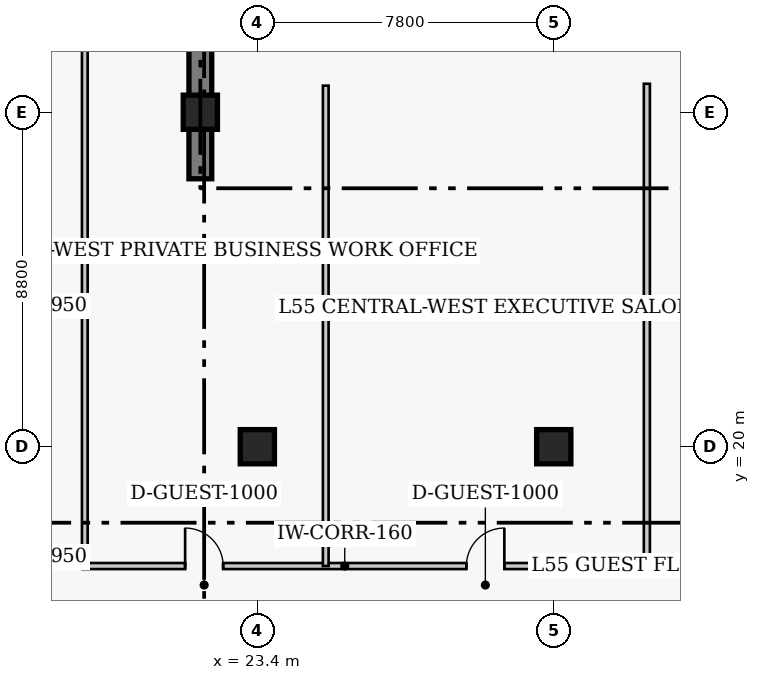
"""IFC4 building model, lengths in metres.
Left out: names, types, materials, properties, quantities, classifications, styles, units other than length and angle.
Written with IfcOpenShell. Run it as: python <this file> out.ifc"""

import sys

from ifc_helpers import new_model, si_unit, direction, frame, frame_2d, origin, origin_2d, place, context, subcontext, project, spatial, rectangle, extrude, element, fill, save


model = new_model("IFC4")
c1 = context("Model", 3, precision=1e-05, world=origin(), true_north=direction((0.0, 1.0)))
c2 = subcontext(c1, "Body", "Model", "MODEL_VIEW")
j1 = project(units=[si_unit("LENGTHUNIT", "METRE"), si_unit("PLANEANGLEUNIT", "RADIAN")], contexts=[c1])
p1 = place(None, origin())
s1 = spatial("IfcSite", under=j1, at=p1, CompositionType="ELEMENT")
p2 = place(p1, origin())
s2 = spatial("IfcBuilding", under=s1, at=p2, CompositionType="ELEMENT")
p3 = place(p2, frame((0.0, 0.0, 220.2)))
s3 = spatial("IfcBuildingStorey", under=s2, at=p3, CompositionType="ELEMENT", Elevation=220.2)
p4 = place(p3, frame((21.9, 27.05, 0.0), z_axis=(0.0, 0.0, 1.0), x_axis=(0.0, 1.0, 0.0)))
e1 = element("IfcWall", 1, at=p4, inside=s3, PredefinedType="SHEAR", context=c2, shape_type="SweptSolid", body=[
    extrude(rectangle(XDim=13.57, YDim=0.6, at=frame_2d((6.785, 0.0))), origin(), (0.0, 0.0, 1.0), 3.9),
])
for number, where, z_axis, x_axis in (
    (2, (23.4, 20.0, 0.0), (0.0, 0.0, 1.0), (1.0, 0.0, 0.0)),
    (3, (31.2, 20.0, 0.0), (0.0, 0.0, 1.0), (1.0, 0.0, 0.0)),
    (4, (21.9, 28.8, 0.0), (0.0, 0.0, 1.0), (1.0, 0.0, 0.0)),
):
    element("IfcColumn", number, at=place(p3, frame(where, z_axis=z_axis, x_axis=x_axis)), inside=s3, PredefinedType="COLUMN", context=c2, shape_type="SweptSolid", body=[
        extrude(rectangle(XDim=0.9, YDim=0.9, at=origin_2d()), origin(), (0.0, 0.0, 1.0), 3.9),
    ])
p5 = place(p3, frame((18.8, 16.86, 0.0), z_axis=(0.0, 0.0, 1.0), x_axis=(1.0, 0.0, 0.0)))
e5 = element("IfcWall", 5, at=p5, inside=s3, PredefinedType="PARTITIONING", context=c2, shape_type="SweptSolid", body=[
    extrude(rectangle(XDim=14.85, YDim=0.16, at=frame_2d((7.425, 0.0))), origin(), (0.0, 0.0, 1.0), 3.65),
])
p6 = place(p5, frame((2.7, 0.0, 0.0)))
e6 = element("IfcOpeningElement", 6, at=p6, cuts=e5, PredefinedType="OPENING", context=c2, shape_type="SweptSolid", body=[
    extrude(rectangle(XDim=1.0, YDim=2.15, at=frame_2d((0.5, 1.075))), frame((0.0, 0.09, 0.0), z_axis=(0.0, -1.0, 0.0), x_axis=(1.0, 0.0, 0.0)), (0.0, 0.0, 1.0), 0.18),
])
p7 = place(p5, frame((10.1, 0.0, 0.0)))
e7 = element("IfcOpeningElement", 7, at=p7, cuts=e5, PredefinedType="OPENING", context=c2, shape_type="SweptSolid", body=[
    extrude(rectangle(XDim=1.0, YDim=2.15, at=frame_2d((0.5, 1.075))), frame((0.0, 0.09, 0.0), z_axis=(0.0, -1.0, 0.0), x_axis=(1.0, 0.0, 0.0)), (0.0, 0.0, 1.0), 0.18),
])
p8 = place(p3, frame((33.65, 16.86, 0.0), z_axis=(0.0, 0.0, 1.0), x_axis=(0.0, 1.0, 0.0)))
e8 = element("IfcWall", 8, at=p8, inside=s3, PredefinedType="PARTITIONING", context=c2, shape_type="SweptSolid", body=[
    extrude(rectangle(XDim=12.69, YDim=0.16, at=frame_2d((6.345, 0.0))), origin(), (0.0, 0.0, 1.0), 3.65),
])
p9 = place(p3, frame((18.86, 16.86, 0.0), z_axis=(0.0, 0.0, 1.0), x_axis=(0.0, 1.0, 0.0)))
e9 = element("IfcWall", 9, at=p9, inside=s3, PredefinedType="PARTITIONING", context=c2, shape_type="SweptSolid", body=[
    extrude(rectangle(XDim=15.94, YDim=0.15, at=frame_2d((7.97, 0.0))), origin(), (0.0, 0.0, 1.0), 3.65),
])
p10 = place(p3, frame((25.2, 16.86, 0.0), z_axis=(0.0, 0.0, 1.0), x_axis=(0.0, 1.0, 0.0)))
e10 = element("IfcWall", 10, at=p10, inside=s3, PredefinedType="PARTITIONING", context=c2, shape_type="SweptSolid", body=[
    extrude(rectangle(XDim=12.64, YDim=0.15, at=frame_2d((6.32, 0.0))), origin(), (0.0, 0.0, 1.0), 3.65),
])
p11 = place(p6, origin())
e11 = element("IfcDoor", 11, at=p11, inside=s3, OperationType="SINGLE_SWING_LEFT", PredefinedType="DOOR", context=c2, shape_type="SweptSolid", body=[
    extrude(rectangle(XDim=1.0, YDim=2.15, at=frame_2d((0.5, 1.075))), frame((0.0, 0.025, 0.0), z_axis=(0.0, -1.0, 0.0), x_axis=(1.0, 0.0, 0.0)), (0.0, 0.0, 1.0), 0.05),
])
fill(e6, e11)
p12 = place(p7, origin())
e12 = element("IfcDoor", 12, at=p12, inside=s3, OperationType="SINGLE_SWING_RIGHT", PredefinedType="DOOR", context=c2, shape_type="SweptSolid", body=[
    extrude(rectangle(XDim=1.0, YDim=2.15, at=frame_2d((0.5, 1.075))), frame((0.0, 0.025, 0.0), z_axis=(0.0, -1.0, 0.0), x_axis=(1.0, 0.0, 0.0)), (0.0, 0.0, 1.0), 0.05),
])
fill(e7, e12)
save(model, sys.argv[1])
